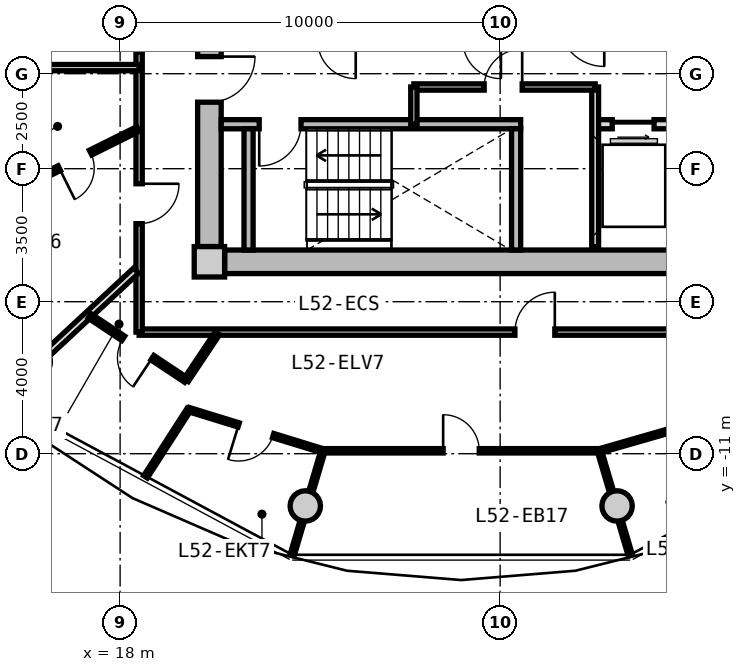
"""IFC4 building model, lengths in metres.
Left out: names, types, materials, properties, quantities, classifications, styles, units other than length and angle.
Written with IfcOpenShell. Run it as: python <this file> out.ifc"""

import sys

from ifc_helpers import new_model, si_unit, direction, frame, frame_2d, origin, origin_2d, place, context, subcontext, project, spatial, rectangle, circle, extrude, source, transform, mapped, element, fill, save


model = new_model("IFC4")
c1 = context("Model", 3, precision=1e-05, world=origin(), true_north=direction((0.0, 1.0)))
c2 = subcontext(c1, "Body", "Model", "MODEL_VIEW")
j1 = project(units=[si_unit("LENGTHUNIT", "METRE"), si_unit("PLANEANGLEUNIT", "RADIAN")], contexts=[c1])
p1 = place(None, origin())
s1 = spatial("IfcSite", under=j1, at=p1, CompositionType="ELEMENT")
p2 = place(p1, origin())
s2 = spatial("IfcBuilding", under=s1, at=p2, CompositionType="ELEMENT")
p3 = place(p2, frame((0.0, 0.0, 167.85)))
s3 = spatial("IfcBuildingStorey", under=s2, at=p3, CompositionType="ELEMENT", Elevation=167.85)
m1 = source(origin(), c2, "Body", "SweptSolid", [
    extrude(rectangle(XDim=0.8, YDim=0.8, at=origin_2d()), origin(), (0.0, 0.0, 1.0), 3.05),
])
p4 = place(p3, frame((20.35, -5.95, 0.0), z_axis=(0.0, 0.0, 1.0), x_axis=(1.0, 0.0, 0.0)))
e1 = element("IfcColumn", 1, at=p4, inside=s3, PredefinedType="COLUMN", context=c2, shape_type="MappedRepresentation", body=[
    mapped(m1, transform((0.0, 0.0, 0.0), x_axis=(1.0, 0.0, 0.0), y_axis=(0.0, 1.0, 0.0), z_axis=(0.0, 0.0, 1.0), scale=1.0)),
])
m2 = source(origin(), c2, "Body", "SweptSolid", [
    extrude(rectangle(XDim=14.5, YDim=0.62, at=frame_2d((7.25, 0.0))), origin(), (0.0, 0.0, 1.0), 2.81),
])
p5 = place(p3, frame((35.25, -5.95, 0.0), z_axis=(0.0, 0.0, 1.0), x_axis=(-1.0, 0.0, 0.0)))
e2 = element("IfcWall", 2, at=p5, inside=s3, PredefinedType="SHEAR", context=c2, shape_type="MappedRepresentation", body=[
    mapped(m2, transform((0.0, 0.0, 0.0), x_axis=(1.0, 0.0, 0.0), y_axis=(0.0, 1.0, 0.0), z_axis=(0.0, 0.0, 1.0), scale=1.0)),
])
m3 = source(origin(), c2, "Body", "SweptSolid", [
    extrude(rectangle(XDim=11.1, YDim=0.62, at=frame_2d((5.55, 0.0))), origin(), (0.0, 0.0, 1.0), 2.81),
])
p6 = place(p3, frame((20.35, -5.55, 0.0), z_axis=(0.0, 0.0, 1.0), x_axis=(0.0, 1.0, 0.0)))
e3 = element("IfcWall", 3, at=p6, inside=s3, PredefinedType="SHEAR", context=c2, shape_type="MappedRepresentation", body=[
    mapped(m3, transform((0.0, 0.0, 0.0), x_axis=(1.0, 0.0, 0.0), y_axis=(0.0, 1.0, 0.0), z_axis=(0.0, 0.0, 1.0), scale=1.0)),
])
p7 = place(p6, frame((3.8, 0.0, 0.0)))
e4 = element("IfcOpeningElement", 4, at=p7, cuts=e3, PredefinedType="OPENING", context=c2, shape_type="SweptSolid", body=[
    extrude(rectangle(XDim=1.2, YDim=2.15, at=frame_2d((0.6, 1.075))), frame((0.0, 0.32, 0.0), z_axis=(0.0, -1.0, 0.0), x_axis=(1.0, 0.0, 0.0)), (0.0, 0.0, 1.0), 0.64),
])
m4 = source(origin(), c2, "Body", "SweptSolid", [
    extrude(circle(Radius=0.4, at=origin_2d()), origin(), (0.0, 0.0, 1.0), 3.05),
])
for number, where, z_axis, x_axis in (
    (5, (22.873, -12.375, 0.0), (0.0, 0.0, 1.0), (1.0, 0.0, 0.0)),
    (6, (31.077, -12.375, 0.0), (0.0, 0.0, 1.0), (1.0, 0.0, 0.0)),
):
    element("IfcColumn", number, at=place(p3, frame(where, z_axis=z_axis, x_axis=x_axis)), inside=s3, PredefinedType="COLUMN", context=c2, shape_type="MappedRepresentation", body=[
        mapped(m4, transform((0.0, 0.0, 0.0), x_axis=(1.0, 0.0, 0.0), y_axis=(0.0, 1.0, 0.0), z_axis=(0.0, 0.0, 1.0), scale=1.0)),
    ])
m5 = source(origin(), c2, "Body", "SweptSolid", [
    extrude(rectangle(XDim=7.88, YDim=0.24, at=frame_2d((3.94, 0.0))), origin(), (0.0, 0.0, 1.0), 2.81),
])
p8 = place(p3, frame((20.66, -2.33, 0.0), z_axis=(0.0, 0.0, 1.0), x_axis=(1.0, 0.0, 0.0)))
e7 = element("IfcWall", 7, at=p8, inside=s3, PredefinedType="PARTITIONING", context=c2, shape_type="MappedRepresentation", body=[
    mapped(m5, transform((0.0, 0.0, 0.0), x_axis=(1.0, 0.0, 0.0), y_axis=(0.0, 1.0, 0.0), z_axis=(0.0, 0.0, 1.0), scale=1.0)),
])
p9 = place(p8, frame((1.0, 0.0, 0.0)))
e8 = element("IfcOpeningElement", 8, at=p9, cuts=e7, PredefinedType="OPENING", context=c2, shape_type="SweptSolid", body=[
    extrude(rectangle(XDim=1.1, YDim=2.15, at=frame_2d((0.55, 1.075))), frame((0.0, 0.13, 0.0), z_axis=(0.0, -1.0, 0.0), x_axis=(1.0, 0.0, 0.0)), (0.0, 0.0, 1.0), 0.26),
])
m6 = source(origin(), c2, "Body", "SweptSolid", [
    extrude(rectangle(XDim=3.19, YDim=0.24, at=frame_2d((1.595, 0.0))), origin(), (0.0, 0.0, 1.0), 2.81),
])
for number, where, z_axis, x_axis in (
    (9, (21.38, -5.64, 0.0), (0.0, 0.0, 1.0), (0.0, 1.0, 0.0)),
    (10, (28.42, -5.64, 0.0), (0.0, 0.0, 1.0), (0.0, 1.0, 0.0)),
):
    element("IfcWall", number, at=place(p3, frame(where, z_axis=z_axis, x_axis=x_axis)), inside=s3, PredefinedType="PARTITIONING", context=c2, shape_type="MappedRepresentation", body=[
        mapped(m6, transform((0.0, 0.0, 0.0), x_axis=(1.0, 0.0, 0.0), y_axis=(0.0, 1.0, 0.0), z_axis=(0.0, 0.0, 1.0), scale=1.0)),
    ])
m7 = source(origin(), c2, "Body", "SweptSolid", [
    extrude(rectangle(XDim=2.05, YDim=0.24, at=frame_2d((1.025, 0.0))), origin(), (0.0, 0.0, 1.0), 2.795),
])
p10 = place(p3, frame((30.5, -2.33, 0.0), z_axis=(0.0, 0.0, 1.0), x_axis=(1.0, 0.0, 0.0)))
e11 = element("IfcWall", 11, at=p10, inside=s3, PredefinedType="PARTITIONING", context=c2, shape_type="MappedRepresentation", body=[
    mapped(m7, transform((0.0, 0.0, 0.0), x_axis=(1.0, 0.0, 0.0), y_axis=(0.0, 1.0, 0.0), z_axis=(0.0, 0.0, 1.0), scale=1.0)),
])
p11 = place(p10, frame((0.45, 0.0, 0.0)))
e12 = element("IfcOpeningElement", 12, at=p11, cuts=e11, PredefinedType="OPENING", context=c2, shape_type="SweptSolid", body=[
    extrude(rectangle(XDim=1.1, YDim=2.2, at=frame_2d((0.55, 1.1))), frame((0.0, 0.13, 0.0), z_axis=(0.0, -1.0, 0.0), x_axis=(1.0, 0.0, 0.0)), (0.0, 0.0, 1.0), 0.26),
])
m8 = source(origin(), c2, "Body", "SweptSolid", [
    extrude(rectangle(XDim=4.2, YDim=0.18, at=frame_2d((2.1, 0.0))), origin(), (0.0, 0.0, 1.0), 2.795),
])
p12 = place(p3, frame((30.5, -5.55, 0.0), z_axis=(0.0, 0.0, 1.0), x_axis=(0.0, 1.0, 0.0)))
e13 = element("IfcWall", 13, at=p12, inside=s3, PredefinedType="PARTITIONING", context=c2, shape_type="MappedRepresentation", body=[
    mapped(m8, transform((0.0, 0.0, 0.0), x_axis=(1.0, 0.0, 0.0), y_axis=(0.0, 1.0, 0.0), z_axis=(0.0, 0.0, 1.0), scale=1.0)),
])
m9 = source(origin(), c2, "Body", "SweptSolid", [
    extrude(rectangle(XDim=4.77, YDim=0.165, at=frame_2d((2.385, 0.0))), origin(), (0.0, 0.0, 1.0), 2.795),
])
p13 = place(p3, frame((25.73, -1.35, 0.0), z_axis=(0.0, 0.0, 1.0), x_axis=(1.0, 0.0, 0.0)))
e14 = element("IfcWall", 14, at=p13, inside=s3, PredefinedType="PARTITIONING", context=c2, shape_type="MappedRepresentation", body=[
    mapped(m9, transform((0.0, 0.0, 0.0), x_axis=(1.0, 0.0, 0.0), y_axis=(0.0, 1.0, 0.0), z_axis=(0.0, 0.0, 1.0), scale=1.0)),
])
p14 = place(p13, frame((1.85, 0.0, 0.0)))
e15 = element("IfcOpeningElement", 15, at=p14, cuts=e14, PredefinedType="OPENING", context=c2, shape_type="SweptSolid", body=[
    extrude(rectangle(XDim=1.0, YDim=2.1, at=frame_2d((0.5, 1.05))), frame((0.0, 0.093, 0.0), z_axis=(0.0, -1.0, 0.0), x_axis=(1.0, 0.0, 0.0)), (0.0, 0.0, 1.0), 0.185),
])
m10 = source(origin(), c2, "Body", "SweptSolid", [
    extrude(rectangle(XDim=0.98, YDim=0.165, at=frame_2d((0.49, 0.0))), origin(), (0.0, 0.0, 1.0), 2.795),
])
p15 = place(p3, frame((25.73, -2.33, 0.0), z_axis=(0.0, 0.0, 1.0), x_axis=(0.0, 1.0, 0.0)))
e16 = element("IfcWall", 16, at=p15, inside=s3, PredefinedType="PARTITIONING", context=c2, shape_type="MappedRepresentation", body=[
    mapped(m10, transform((0.0, 0.0, 0.0), x_axis=(1.0, 0.0, 0.0), y_axis=(0.0, 1.0, 0.0), z_axis=(0.0, 0.0, 1.0), scale=1.0)),
])
m11 = source(origin(), c2, "Body", "SweptSolid", [
    extrude(rectangle(XDim=19.0, YDim=0.165, at=frame_2d((9.5, 0.0))), origin(), (0.0, 0.0, 1.0), 2.795),
])
p16 = place(p3, frame((37.5, -7.8, 0.0), z_axis=(0.0, 0.0, 1.0), x_axis=(-1.0, 0.0, 0.0)))
e17 = element("IfcWall", 17, at=p16, inside=s3, PredefinedType="PARTITIONING", context=c2, shape_type="MappedRepresentation", body=[
    mapped(m11, transform((0.0, 0.0, 0.0), x_axis=(1.0, 0.0, 0.0), y_axis=(0.0, 1.0, 0.0), z_axis=(0.0, 0.0, 1.0), scale=1.0)),
])
p17 = place(p16, frame((8.061, 0.0, 0.0)))
e18 = element("IfcOpeningElement", 18, at=p17, cuts=e17, PredefinedType="OPENING", context=c2, shape_type="SweptSolid", body=[
    extrude(rectangle(XDim=1.05, YDim=2.15, at=frame_2d((0.525, 1.075))), frame((0.0, 0.093, 0.0), z_axis=(0.0, -1.0, 0.0), x_axis=(1.0, 0.0, 0.0)), (0.0, 0.0, 1.0), 0.185),
])
m12 = source(origin(), c2, "Body", "SweptSolid", [
    extrude(rectangle(XDim=7.365, YDim=0.165, at=frame_2d((3.682, 0.0))), origin(), (0.0, 0.0, 1.0), 2.795),
])
p18 = place(p3, frame((18.5, -7.8, 0.0), z_axis=(0.0, 0.0, 1.0), x_axis=(0.0, 1.0, 0.0)))
e19 = element("IfcWall", 19, at=p18, inside=s3, PredefinedType="PARTITIONING", context=c2, shape_type="MappedRepresentation", body=[
    mapped(m12, transform((0.0, 0.0, 0.0), x_axis=(1.0, 0.0, 0.0), y_axis=(0.0, 1.0, 0.0), z_axis=(0.0, 0.0, 1.0), scale=1.0)),
])
p19 = place(p18, frame((2.854, 0.0, 0.0)))
e20 = element("IfcOpeningElement", 20, at=p19, cuts=e19, PredefinedType="OPENING", context=c2, shape_type="SweptSolid", body=[
    extrude(rectangle(XDim=1.05, YDim=2.15, at=frame_2d((0.525, 1.075))), frame((0.0, 0.093, 0.0), z_axis=(0.0, -1.0, 0.0), x_axis=(1.0, 0.0, 0.0)), (0.0, 0.0, 1.0), 0.185),
])
m13 = source(origin(), c2, "Body", "SweptSolid", [
    extrude(rectangle(XDim=8.189, YDim=0.165, at=frame_2d((4.094, 0.0))), origin(), (0.0, 0.0, 1.0), 2.795),
])
p20 = place(p3, frame((18.5, -0.84, 0.0), z_axis=(0.0, 0.0, 1.0), x_axis=(-1.0, 0.0, 0.0)))
e21 = element("IfcWall", 21, at=p20, inside=s3, PredefinedType="PARTITIONING", context=c2, shape_type="MappedRepresentation", body=[
    mapped(m13, transform((0.0, 0.0, 0.0), x_axis=(1.0, 0.0, 0.0), y_axis=(0.0, 1.0, 0.0), z_axis=(0.0, 0.0, 1.0), scale=1.0)),
])
m14 = source(origin(), c2, "Body", "SweptSolid", [
    extrude(rectangle(XDim=4.927, YDim=0.19, at=frame_2d((2.463, 0.0))), origin(), (0.0, 0.0, 1.0), 2.345),
])
p21 = place(p3, frame((18.42, -6.183, 0.0), z_axis=(0.0, 0.0, 1.0), x_axis=(-0.732191335987, -0.681098999783, 0.0)))
e22 = element("IfcWall", 22, at=p21, inside=s3, PredefinedType="PARTITIONING", context=c2, shape_type="MappedRepresentation", body=[
    mapped(m14, transform((0.0, 0.0, 0.0), x_axis=(1.0, 0.0, 0.0), y_axis=(0.0, 1.0, 0.0), z_axis=(0.0, 0.0, 1.0), scale=1.0)),
])
m15 = source(origin(), c2, "Body", "SweptSolid", [
    extrude(rectangle(XDim=3.707, YDim=0.14, at=frame_2d((1.854, 0.0))), origin(), (0.0, 0.0, 1.0), 2.795),
])
p22 = place(p3, frame((18.47, -2.456, 0.0), z_axis=(0.0, 0.0, 1.0), x_axis=(-0.895347377717, -0.44536846904, 0.0)))
e23 = element("IfcWall", 23, at=p22, inside=s3, PredefinedType="PARTITIONING", context=c2, shape_type="MappedRepresentation", body=[
    mapped(m15, transform((0.0, 0.0, 0.0), x_axis=(1.0, 0.0, 0.0), y_axis=(0.0, 1.0, 0.0), z_axis=(0.0, 0.0, 1.0), scale=1.0)),
])
p23 = place(p22, frame((1.394, 0.0, 0.0)))
e24 = element("IfcOpeningElement", 24, at=p23, cuts=e23, PredefinedType="OPENING", context=c2, shape_type="SweptSolid", body=[
    extrude(rectangle(XDim=0.92, YDim=2.1, at=frame_2d((0.46, 1.05))), frame((0.0, 0.08, 0.0), z_axis=(0.0, -1.0, 0.0), x_axis=(1.0, 0.0, 0.0)), (0.0, 0.0, 1.0), 0.16),
])
m16 = source(origin(), c2, "Body", "SweptSolid", [
    extrude(rectangle(XDim=7.274, YDim=0.115, at=frame_2d((3.637, 0.0))), origin(), (0.0, 0.0, 1.0), 2.795),
])
p24 = place(p3, frame((23.338, -10.924, 0.0), z_axis=(0.0, 0.0, 1.0), x_axis=(1.0, 0.0, 0.0)))
e25 = element("IfcWall", 25, at=p24, inside=s3, PredefinedType="PARTITIONING", context=c2, shape_type="MappedRepresentation", body=[
    mapped(m16, transform((0.0, 0.0, 0.0), x_axis=(1.0, 0.0, 0.0), y_axis=(0.0, 1.0, 0.0), z_axis=(0.0, 0.0, 1.0), scale=1.0)),
])
p25 = place(p24, frame((3.162, 0.0, 0.0)))
e26 = element("IfcOpeningElement", 26, at=p25, cuts=e25, PredefinedType="OPENING", context=c2, shape_type="SweptSolid", body=[
    extrude(rectangle(XDim=0.95, YDim=2.1, at=frame_2d((0.475, 1.05))), frame((0.0, 0.067, 0.0), z_axis=(0.0, -1.0, 0.0), x_axis=(1.0, 0.0, 0.0)), (0.0, 0.0, 1.0), 0.135),
])
m17 = source(origin(), c2, "Body", "SweptSolid", [
    extrude(rectangle(XDim=2.874, YDim=0.115, at=frame_2d((1.437, 0.0))), origin(), (0.0, 0.0, 1.0), 2.345),
])
p26 = place(p3, frame((23.338, -10.924, 0.0), z_axis=(0.0, 0.0, 1.0), x_axis=(-0.283573427988, -0.958950525804, 0.0)))
e27 = element("IfcWall", 27, at=p26, inside=s3, PredefinedType="PARTITIONING", context=c2, shape_type="MappedRepresentation", body=[
    mapped(m17, transform((0.0, 0.0, 0.0), x_axis=(1.0, 0.0, 0.0), y_axis=(0.0, 1.0, 0.0), z_axis=(0.0, 0.0, 1.0), scale=1.0)),
])
m18 = source(origin(), c2, "Body", "SweptSolid", [
    extrude(rectangle(XDim=7.911, YDim=0.115, at=frame_2d((3.955, 0.0))), origin(), (0.0, 0.0, 1.0), 2.345),
])
p27 = place(p3, frame((30.613, -10.927, 0.0), z_axis=(0.0, 0.0, 1.0), x_axis=(0.961104741235, 0.276184134908, 0.0)))
e28 = element("IfcWall", 28, at=p27, inside=s3, PredefinedType="PARTITIONING", context=c2, shape_type="MappedRepresentation", body=[
    mapped(m18, transform((0.0, 0.0, 0.0), x_axis=(1.0, 0.0, 0.0), y_axis=(0.0, 1.0, 0.0), z_axis=(0.0, 0.0, 1.0), scale=1.0)),
])
p28 = place(p27, frame((3.48, 0.0, 0.0)))
e29 = element("IfcOpeningElement", 29, at=p28, cuts=e28, PredefinedType="OPENING", context=c2, shape_type="SweptSolid", body=[
    extrude(rectangle(XDim=0.95, YDim=2.1, at=frame_2d((0.475, 1.05))), frame((0.0, 0.067, 0.0), z_axis=(0.0, -1.0, 0.0), x_axis=(1.0, 0.0, 0.0)), (0.0, 0.0, 1.0), 0.135),
])
m19 = source(origin(), c2, "Body", "SweptSolid", [
    extrude(rectangle(XDim=2.871, YDim=0.115, at=frame_2d((1.436, 0.0))), origin(), (0.0, 0.0, 1.0), 2.345),
])
p29 = place(p3, frame((30.613, -10.927, 0.0), z_axis=(0.0, 0.0, 1.0), x_axis=(0.283616326168, -0.958937839242, 0.0)))
e30 = element("IfcWall", 30, at=p29, inside=s3, PredefinedType="PARTITIONING", context=c2, shape_type="MappedRepresentation", body=[
    mapped(m19, transform((0.0, 0.0, 0.0), x_axis=(1.0, 0.0, 0.0), y_axis=(0.0, 1.0, 0.0), z_axis=(0.0, 0.0, 1.0), scale=1.0)),
])
m20 = source(origin(), c2, "Body", "SweptSolid", [
    extrude(rectangle(XDim=1.482, YDim=0.14, at=frame_2d((0.741, 0.0))), origin(), (0.0, 0.0, 1.0), 2.795),
])
p30 = place(p3, frame((20.56, -7.83, 0.0), z_axis=(0.0, 0.0, 1.0), x_axis=(-0.555308105158, -0.831644700786, 0.0)))
e31 = element("IfcWall", 31, at=p30, inside=s3, PredefinedType="PARTITIONING", context=c2, shape_type="MappedRepresentation", body=[
    mapped(m20, transform((0.0, 0.0, 0.0), x_axis=(1.0, 0.0, 0.0), y_axis=(0.0, 1.0, 0.0), z_axis=(0.0, 0.0, 1.0), scale=1.0)),
])
m21 = source(origin(), c2, "Body", "SweptSolid", [
    extrude(rectangle(XDim=3.051, YDim=0.14, at=frame_2d((1.525, 0.0))), origin(), (0.0, 0.0, 1.0), 2.795),
])
p31 = place(p3, frame((19.737, -9.063, 0.0), z_axis=(0.0, 0.0, 1.0), x_axis=(-0.832763694299, 0.553628602456, 0.0)))
e32 = element("IfcWall", 32, at=p31, inside=s3, PredefinedType="PARTITIONING", context=c2, shape_type="MappedRepresentation", body=[
    mapped(m21, transform((0.0, 0.0, 0.0), x_axis=(1.0, 0.0, 0.0), y_axis=(0.0, 1.0, 0.0), z_axis=(0.0, 0.0, 1.0), scale=1.0)),
])
p32 = place(p31, frame((1.065, 0.0, 0.0)))
e33 = element("IfcOpeningElement", 33, at=p32, cuts=e32, PredefinedType="OPENING", context=c2, shape_type="SweptSolid", body=[
    extrude(rectangle(XDim=0.92, YDim=2.1, at=frame_2d((0.46, 1.05))), frame((0.0, 0.08, 0.0), z_axis=(0.0, -1.0, 0.0), x_axis=(1.0, 0.0, 0.0)), (0.0, 0.0, 1.0), 0.16),
])
m22 = source(origin(), c2, "Body", "SweptSolid", [
    extrude(rectangle(XDim=2.105, YDim=0.115, at=frame_2d((1.052, 0.0))), origin(), (0.0, 0.0, 1.0), 2.795),
])
p33 = place(p3, frame((19.808, -9.839, 0.0), z_axis=(0.0, 0.0, 1.0), x_axis=(-0.541542884204, -0.840673125875, 0.0)))
e34 = element("IfcWall", 34, at=p33, inside=s3, PredefinedType="PARTITIONING", context=c2, shape_type="MappedRepresentation", body=[
    mapped(m22, transform((0.0, 0.0, 0.0), x_axis=(1.0, 0.0, 0.0), y_axis=(0.0, 1.0, 0.0), z_axis=(0.0, 0.0, 1.0), scale=1.0)),
])
m23 = source(origin(), c2, "Body", "SweptSolid", [
    extrude(rectangle(XDim=3.693, YDim=0.115, at=frame_2d((1.847, 0.0))), origin(), (0.0, 0.0, 1.0), 2.795),
])
p34 = place(p3, frame((19.808, -9.839, 0.0), z_axis=(0.0, 0.0, 1.0), x_axis=(0.955691778506, -0.294369197599, 0.0)))
e35 = element("IfcWall", 35, at=p34, inside=s3, PredefinedType="PARTITIONING", context=c2, shape_type="MappedRepresentation", body=[
    mapped(m23, transform((0.0, 0.0, 0.0), x_axis=(1.0, 0.0, 0.0), y_axis=(0.0, 1.0, 0.0), z_axis=(0.0, 0.0, 1.0), scale=1.0)),
])
p35 = place(p34, frame((1.372, 0.0, 0.0)))
e36 = element("IfcOpeningElement", 36, at=p35, cuts=e35, PredefinedType="OPENING", context=c2, shape_type="SweptSolid", body=[
    extrude(rectangle(XDim=0.95, YDim=2.1, at=frame_2d((0.475, 1.05))), frame((0.0, 0.067, 0.0), z_axis=(0.0, -1.0, 0.0), x_axis=(1.0, 0.0, 0.0)), (0.0, 0.0, 1.0), 0.135),
])
m24 = source(origin(), c2, "Body", "SweptSolid", [
    extrude(rectangle(XDim=1.1, YDim=2.15, at=frame_2d((0.55, 1.075))), frame((0.0, 0.025, 0.0), z_axis=(0.0, -1.0, 0.0), x_axis=(1.0, 0.0, 0.0)), (0.0, 0.0, 1.0), 0.05),
])
p36 = place(p9, frame((1.1, 0.0, 0.0), z_axis=(0.0, 0.0, 1.0), x_axis=(-1.0, 0.0, 0.0)))
e37 = element("IfcDoor", 37, at=p36, inside=s3, OperationType="SINGLE_SWING_RIGHT", PredefinedType="DOOR", context=c2, shape_type="MappedRepresentation", body=[
    mapped(m24, transform((0.0, 0.0, 0.0), x_axis=(1.0, 0.0, 0.0), y_axis=(0.0, 1.0, 0.0), z_axis=(0.0, 0.0, 1.0), scale=1.0)),
])
fill(e8, e37)
m25 = source(origin(), c2, "Body", "SweptSolid", [
    extrude(rectangle(XDim=1.2, YDim=2.15, at=frame_2d((0.6, 1.075))), frame((0.0, 0.025, 0.0), z_axis=(0.0, -1.0, 0.0), x_axis=(1.0, 0.0, 0.0)), (0.0, 0.0, 1.0), 0.05),
])
p37 = place(p7, frame((1.2, 0.0, 0.0), z_axis=(0.0, 0.0, 1.0), x_axis=(-1.0, 0.0, 0.0)))
e38 = element("IfcDoor", 38, at=p37, inside=s3, OperationType="SINGLE_SWING_LEFT", PredefinedType="DOOR", context=c2, shape_type="MappedRepresentation", body=[
    mapped(m25, transform((0.0, 0.0, 0.0), x_axis=(1.0, 0.0, 0.0), y_axis=(0.0, 1.0, 0.0), z_axis=(0.0, 0.0, 1.0), scale=1.0)),
])
fill(e4, e38)
m26 = source(origin(), c2, "Body", "SweptSolid", [
    extrude(rectangle(XDim=1.1, YDim=2.2, at=frame_2d((0.55, 1.1))), frame((0.0, 0.025, 0.0), z_axis=(0.0, -1.0, 0.0), x_axis=(1.0, 0.0, 0.0)), (0.0, 0.0, 1.0), 0.05),
])
p38 = place(p11, frame((1.1, 0.0, 0.0), z_axis=(0.0, 0.0, 1.0), x_axis=(-1.0, 0.0, 0.0)))
e39 = element("IfcDoor", 39, at=p38, inside=s3, OperationType="SLIDING_TO_RIGHT", PredefinedType="DOOR", context=c2, shape_type="MappedRepresentation", body=[
    mapped(m26, transform((0.0, 0.0, 0.0), x_axis=(1.0, 0.0, 0.0), y_axis=(0.0, 1.0, 0.0), z_axis=(0.0, 0.0, 1.0), scale=1.0)),
])
fill(e12, e39)
m27 = source(origin(), c2, "Body", "SweptSolid", [
    extrude(rectangle(XDim=1.0, YDim=2.1, at=frame_2d((0.5, 1.05))), frame((0.0, 0.025, 0.0), z_axis=(0.0, -1.0, 0.0), x_axis=(1.0, 0.0, 0.0)), (0.0, 0.0, 1.0), 0.05),
])
p39 = place(p14, origin())
e40 = element("IfcDoor", 40, at=p39, inside=s3, OperationType="SINGLE_SWING_RIGHT", PredefinedType="DOOR", context=c2, shape_type="MappedRepresentation", body=[
    mapped(m27, transform((0.0, 0.0, 0.0), x_axis=(1.0, 0.0, 0.0), y_axis=(0.0, 1.0, 0.0), z_axis=(0.0, 0.0, 1.0), scale=1.0)),
])
fill(e15, e40)
m28 = source(origin(), c2, "Body", "SweptSolid", [
    extrude(rectangle(XDim=1.05, YDim=2.15, at=frame_2d((0.525, 1.075))), frame((0.0, 0.025, 0.0), z_axis=(0.0, -1.0, 0.0), x_axis=(1.0, 0.0, 0.0)), (0.0, 0.0, 1.0), 0.05),
])
p40 = place(p19, frame((1.05, 0.0, 0.0), z_axis=(0.0, 0.0, 1.0), x_axis=(-1.0, 0.0, 0.0)))
e41 = element("IfcDoor", 41, at=p40, inside=s3, OperationType="SINGLE_SWING_LEFT", PredefinedType="DOOR", context=c2, shape_type="MappedRepresentation", body=[
    mapped(m28, transform((0.0, 0.0, 0.0), x_axis=(1.0, 0.0, 0.0), y_axis=(0.0, 1.0, 0.0), z_axis=(0.0, 0.0, 1.0), scale=1.0)),
])
fill(e20, e41)
m29 = source(origin(), c2, "Body", "SweptSolid", [
    extrude(rectangle(XDim=0.92, YDim=2.1, at=frame_2d((0.46, 1.05))), frame((0.0, 0.025, 0.0), z_axis=(0.0, -1.0, 0.0), x_axis=(1.0, 0.0, 0.0)), (0.0, 0.0, 1.0), 0.05),
])
p41 = place(p23, origin())
e42 = element("IfcDoor", 42, at=p41, inside=s3, OperationType="SINGLE_SWING_RIGHT", PredefinedType="DOOR", context=c2, shape_type="MappedRepresentation", body=[
    mapped(m29, transform((0.0, 0.0, 0.0), x_axis=(1.0, 0.0, 0.0), y_axis=(0.0, 1.0, 0.0), z_axis=(0.0, 0.0, 1.0), scale=1.0)),
])
fill(e24, e42)
p42 = place(p17, frame((1.05, 0.0, 0.0), z_axis=(0.0, 0.0, 1.0), x_axis=(-1.0, 0.0, 0.0)))
e43 = element("IfcDoor", 43, at=p42, inside=s3, OperationType="SINGLE_SWING_RIGHT", PredefinedType="DOOR", context=c2, shape_type="MappedRepresentation", body=[
    mapped(m28, transform((0.0, 0.0, 0.0), x_axis=(1.0, 0.0, 0.0), y_axis=(0.0, 1.0, 0.0), z_axis=(0.0, 0.0, 1.0), scale=1.0)),
])
fill(e18, e43)
p43 = place(p32, origin())
e44 = element("IfcDoor", 44, at=p43, inside=s3, OperationType="SINGLE_SWING_LEFT", PredefinedType="DOOR", context=c2, shape_type="MappedRepresentation", body=[
    mapped(m29, transform((0.0, 0.0, 0.0), x_axis=(1.0, 0.0, 0.0), y_axis=(0.0, 1.0, 0.0), z_axis=(0.0, 0.0, 1.0), scale=1.0)),
])
fill(e33, e44)
m30 = source(origin(), c2, "Body", "SweptSolid", [
    extrude(rectangle(XDim=0.95, YDim=2.1, at=frame_2d((0.475, 1.05))), frame((0.0, 0.025, 0.0), z_axis=(0.0, -1.0, 0.0), x_axis=(1.0, 0.0, 0.0)), (0.0, 0.0, 1.0), 0.05),
])
p44 = place(p35, frame((0.95, 0.0, 0.0), z_axis=(0.0, 0.0, 1.0), x_axis=(-1.0, 0.0, 0.0)))
e45 = element("IfcDoor", 45, at=p44, inside=s3, OperationType="SINGLE_SWING_RIGHT", PredefinedType="DOOR", context=c2, shape_type="MappedRepresentation", body=[
    mapped(m30, transform((0.0, 0.0, 0.0), x_axis=(1.0, 0.0, 0.0), y_axis=(0.0, 1.0, 0.0), z_axis=(0.0, 0.0, 1.0), scale=1.0)),
])
fill(e36, e45)
p45 = place(p25, origin())
e46 = element("IfcDoor", 46, at=p45, inside=s3, OperationType="SINGLE_SWING_LEFT", PredefinedType="DOOR", context=c2, shape_type="MappedRepresentation", body=[
    mapped(m30, transform((0.0, 0.0, 0.0), x_axis=(1.0, 0.0, 0.0), y_axis=(0.0, 1.0, 0.0), z_axis=(0.0, 0.0, 1.0), scale=1.0)),
])
fill(e26, e46)
save(model, sys.argv[1])
